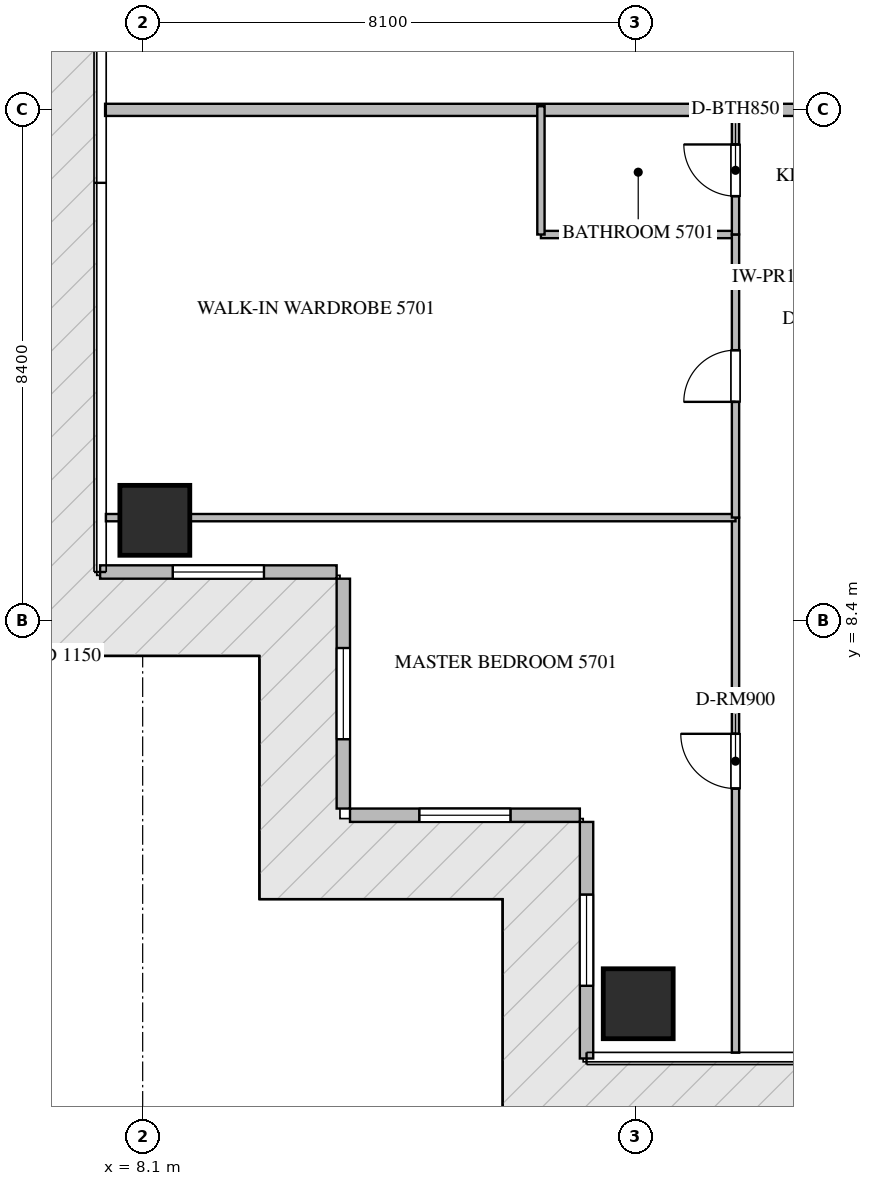
"""IFC4 building model, lengths in metres.
Left out: names, types, materials, properties, quantities, classifications, styles, units other than length and angle.
Written with IfcOpenShell. Run it as: python <this file> out.ifc"""

import sys

from ifc_helpers import new_model, si_unit, direction, frame, frame_2d, origin, origin_2d, place, context, subcontext, project, spatial, rectangle, extrude, source, transform, mapped, element, fill, save


model = new_model("IFC4")
c1 = context("Model", 3, precision=1e-05, world=origin(), true_north=direction((0.0, 1.0)))
c2 = subcontext(c1, "Body", "Model", "MODEL_VIEW")
j1 = project(units=[si_unit("LENGTHUNIT", "METRE"), si_unit("PLANEANGLEUNIT", "RADIAN")], contexts=[c1])
p1 = place(None, origin())
s1 = spatial("IfcSite", under=j1, at=p1, CompositionType="ELEMENT")
p2 = place(p1, origin())
s2 = spatial("IfcBuilding", under=s1, at=p2, CompositionType="ELEMENT")
p3 = place(p2, frame((0.0, 0.0, 229.7)))
s3 = spatial("IfcBuildingStorey", under=s2, at=p3, CompositionType="ELEMENT", Elevation=229.7)
m1 = source(origin(), c2, "Body", "SweptSolid", [
    extrude(rectangle(XDim=1.15, YDim=1.15, at=origin_2d()), origin(), (0.0, 0.0, 1.0), 3.85),
])
for number, where, z_axis, x_axis in (
    (1, (16.25, 2.1, -0.26), (0.0, 0.0, 1.0), (1.0, 0.0, 0.0)),
    (2, (8.3, 10.05, -0.26), (0.0, 0.0, 1.0), (1.0, 0.0, 0.0)),
):
    element("IfcColumn", number, at=place(p3, frame(where, z_axis=z_axis, x_axis=x_axis)), inside=s3, PredefinedType="COLUMN", context=c2, shape_type="MappedRepresentation", body=[
        mapped(m1, transform((0.0, 0.0, 0.0), scale=1.0)),
    ])
p4 = place(p3, frame((7.4, 9.2, 0.0), z_axis=(0.0, 0.0, 1.0), x_axis=(1.0, 0.0, 0.0)))
e3 = element("IfcWall", 3, at=p4, inside=s3, PredefinedType="ELEMENTEDWALL", context=c2, shape_type="SweptSolid", body=[
    extrude(rectangle(XDim=3.89, YDim=0.22, at=frame_2d((1.945, 0.0))), origin(), (0.0, 0.0, 1.0), 3.575),
])
p5 = place(p4, frame((1.195, 0.0, 0.65)))
e4 = element("IfcOpeningElement", 4, at=p5, cuts=e3, PredefinedType="OPENING", context=c2, shape_type="SweptSolid", body=[
    extrude(rectangle(XDim=1.5, YDim=2.25, at=frame_2d((0.75, 1.125))), frame((0.0, 0.12, 0.0), z_axis=(0.0, -1.0, 0.0), x_axis=(1.0, 0.0, 0.0)), (0.0, 0.0, 1.0), 0.24),
])
p6 = place(p3, frame((11.4, 9.09, 0.0), z_axis=(0.0, 0.0, 1.0), x_axis=(0.0, -1.0, 0.0)))
e5 = element("IfcWall", 5, at=p6, inside=s3, PredefinedType="ELEMENTEDWALL", context=c2, shape_type="SweptSolid", body=[
    extrude(rectangle(XDim=3.78, YDim=0.22, at=frame_2d((1.89, 0.0))), origin(), (0.0, 0.0, 1.0), 3.575),
])
p7 = place(p6, frame((1.14, 0.0, 0.65)))
e6 = element("IfcOpeningElement", 6, at=p7, cuts=e5, PredefinedType="OPENING", context=c2, shape_type="SweptSolid", body=[
    extrude(rectangle(XDim=1.5, YDim=2.25, at=frame_2d((0.75, 1.125))), frame((0.0, 0.12, 0.0), z_axis=(0.0, -1.0, 0.0), x_axis=(1.0, 0.0, 0.0)), (0.0, 0.0, 1.0), 0.24),
])
p8 = place(p3, frame((11.51, 5.2, 0.0), z_axis=(0.0, 0.0, 1.0), x_axis=(1.0, 0.0, 0.0)))
e7 = element("IfcWall", 7, at=p8, inside=s3, PredefinedType="ELEMENTEDWALL", context=c2, shape_type="SweptSolid", body=[
    extrude(rectangle(XDim=3.78, YDim=0.22, at=frame_2d((1.89, 0.0))), origin(), (0.0, 0.0, 1.0), 3.575),
])
p9 = place(p8, frame((1.14, 0.0, 0.65)))
e8 = element("IfcOpeningElement", 8, at=p9, cuts=e7, PredefinedType="OPENING", context=c2, shape_type="SweptSolid", body=[
    extrude(rectangle(XDim=1.5, YDim=2.25, at=frame_2d((0.75, 1.125))), frame((0.0, 0.12, 0.0), z_axis=(0.0, -1.0, 0.0), x_axis=(1.0, 0.0, 0.0)), (0.0, 0.0, 1.0), 0.24),
])
p10 = place(p3, frame((15.4, 5.09, 0.0), z_axis=(0.0, 0.0, 1.0), x_axis=(0.0, -1.0, 0.0)))
e9 = element("IfcWall", 9, at=p10, inside=s3, PredefinedType="ELEMENTEDWALL", context=c2, shape_type="SweptSolid", body=[
    extrude(rectangle(XDim=3.89, YDim=0.22, at=frame_2d((1.945, 0.0))), origin(), (0.0, 0.0, 1.0), 3.575),
])
p11 = place(p10, frame((1.195, 0.0, 0.65)))
e10 = element("IfcOpeningElement", 10, at=p11, cuts=e9, PredefinedType="OPENING", context=c2, shape_type="SweptSolid", body=[
    extrude(rectangle(XDim=1.5, YDim=2.25, at=frame_2d((0.75, 1.125))), frame((0.0, 0.12, 0.0), z_axis=(0.0, -1.0, 0.0), x_axis=(1.0, 0.0, 0.0)), (0.0, 0.0, 1.0), 0.24),
])
p12 = place(p3, frame((7.482, 16.8, 0.0), z_axis=(0.0, 0.0, 1.0), x_axis=(1.0, 0.0, 0.0)))
e11 = element("IfcWall", 11, at=p12, inside=s3, PredefinedType="PARTITIONING", context=c2, shape_type="SweptSolid", body=[
    extrude(rectangle(XDim=13.418, YDim=0.2, at=frame_2d((6.709, 0.0))), origin(), (0.0, 0.0, 1.0), 3.59),
])
p13 = place(p3, frame((17.85, 14.05, 0.0), z_axis=(0.0, 0.0, 1.0), x_axis=(1.0, 0.0, 0.0)))
e12 = element("IfcWall", 12, at=p13, inside=s3, PredefinedType="PARTITIONING", context=c2, shape_type="SweptSolid", body=[
    extrude(rectangle(XDim=2.85, YDim=0.12, at=frame_2d((1.425, 0.0))), origin(), (0.0, 0.0, 1.0), 3.59),
])
p14 = place(p13, frame((1.0, 0.0, 0.0)))
e13 = element("IfcOpeningElement", 13, at=p14, cuts=e12, PredefinedType="OPENING", context=c2, shape_type="SweptSolid", body=[
    extrude(rectangle(XDim=0.85, YDim=2.1, at=frame_2d((0.425, 1.05))), frame((0.0, 0.07, 0.0), z_axis=(0.0, -1.0, 0.0), x_axis=(1.0, 0.0, 0.0)), (0.0, 0.0, 1.0), 0.14),
])
p15 = place(p3, frame((17.85, 1.295, 0.0), z_axis=(0.0, 0.0, 1.0), x_axis=(0.0, 1.0, 0.0)))
e14 = element("IfcWall", 14, at=p15, inside=s3, PredefinedType="PARTITIONING", context=c2, shape_type="SweptSolid", body=[
    extrude(rectangle(XDim=8.799, YDim=0.12, at=frame_2d((4.399, 0.0))), origin(), (0.0, 0.0, 1.0), 3.59),
])
p16 = place(p15, frame((4.344, 0.0, 0.0)))
e15 = element("IfcOpeningElement", 15, at=p16, cuts=e14, PredefinedType="OPENING", context=c2, shape_type="SweptSolid", body=[
    extrude(rectangle(XDim=0.9, YDim=2.1, at=frame_2d((0.45, 1.05))), frame((0.0, 0.07, 0.0), z_axis=(0.0, -1.0, 0.0), x_axis=(1.0, 0.0, 0.0)), (0.0, 0.0, 1.0), 0.14),
])
p17 = place(p3, frame((7.495, 10.094, 0.0), z_axis=(0.0, 0.0, 1.0), x_axis=(1.0, 0.0, 0.0)))
e16 = element("IfcWall", 16, at=p17, inside=s3, PredefinedType="PARTITIONING", context=c2, shape_type="SweptSolid", body=[
    extrude(rectangle(XDim=10.355, YDim=0.12, at=frame_2d((5.177, 0.0))), origin(), (0.0, 0.0, 1.0), 3.122),
])
p18 = place(p3, frame((14.65, 14.75, 0.0), z_axis=(0.0, 0.0, 1.0), x_axis=(1.0, 0.0, 0.0)))
e17 = element("IfcWall", 17, at=p18, inside=s3, PredefinedType="PARTITIONING", context=c2, shape_type="SweptSolid", body=[
    extrude(rectangle(XDim=3.2, YDim=0.12, at=frame_2d((1.6, 0.0))), origin(), (0.0, 0.0, 1.0), 3.59),
])
p19 = place(p3, frame((14.65, 14.75, 0.0), z_axis=(0.0, 0.0, 1.0), x_axis=(0.0, 1.0, 0.0)))
e18 = element("IfcWall", 18, at=p19, inside=s3, PredefinedType="PARTITIONING", context=c2, shape_type="SweptSolid", body=[
    extrude(rectangle(XDim=2.11, YDim=0.12, at=frame_2d((1.055, 0.0))), origin(), (0.0, 0.0, 1.0), 3.59),
])
p20 = place(p3, frame((17.85, 10.096, 0.0), z_axis=(0.0, 0.0, 1.0), x_axis=(0.0, 1.0, 0.0)))
e19 = element("IfcWall", 19, at=p20, inside=s3, PredefinedType="PARTITIONING", context=c2, shape_type="SweptSolid", body=[
    extrude(rectangle(XDim=4.654, YDim=0.12, at=frame_2d((2.327, 0.0))), origin(), (0.0, 0.0, 1.0), 3.59),
])
p21 = place(p20, frame((1.902, 0.0, 0.0)))
e20 = element("IfcOpeningElement", 20, at=p21, cuts=e19, PredefinedType="OPENING", context=c2, shape_type="SweptSolid", body=[
    extrude(rectangle(XDim=0.85, YDim=2.1, at=frame_2d((0.425, 1.05))), frame((0.0, 0.07, 0.0), z_axis=(0.0, -1.0, 0.0), x_axis=(1.0, 0.0, 0.0)), (0.0, 0.0, 1.0), 0.14),
])
p22 = place(p3, frame((17.85, 14.752, 0.0), z_axis=(0.0, 0.0, 1.0), x_axis=(0.0, 1.0, 0.0)))
e21 = element("IfcWall", 21, at=p22, inside=s3, PredefinedType="PARTITIONING", context=c2, shape_type="SweptSolid", body=[
    extrude(rectangle(XDim=2.108, YDim=0.12, at=frame_2d((1.054, 0.0))), origin(), (0.0, 0.0, 1.0), 3.59),
])
p23 = place(p22, frame((0.629, 0.0, 0.0)))
e22 = element("IfcOpeningElement", 22, at=p23, cuts=e21, PredefinedType="OPENING", context=c2, shape_type="SweptSolid", body=[
    extrude(rectangle(XDim=0.85, YDim=2.1, at=frame_2d((0.425, 1.05))), frame((0.0, 0.07, 0.0), z_axis=(0.0, -1.0, 0.0), x_axis=(1.0, 0.0, 0.0)), (0.0, 0.0, 1.0), 0.14),
])
m2 = source(origin(), c2, "Body", "SweptSolid", [
    extrude(rectangle(XDim=1.5, YDim=2.25, at=frame_2d((0.75, 1.125))), frame((0.0, 0.03, 0.0), z_axis=(0.0, -1.0, 0.0), x_axis=(1.0, 0.0, 0.0)), (0.0, 0.0, 1.0), 0.06),
])
p24 = place(p5, origin())
e23 = element("IfcWindow", 23, at=p24, inside=s3, PartitioningType="SINGLE_PANEL", PredefinedType="WINDOW", context=c2, shape_type="MappedRepresentation", body=[
    mapped(m2, transform((0.0, 0.0, 0.0), scale=1.0)),
])
fill(e4, e23)
p25 = place(p7, origin())
e24 = element("IfcWindow", 24, at=p25, inside=s3, PartitioningType="SINGLE_PANEL", PredefinedType="WINDOW", context=c2, shape_type="MappedRepresentation", body=[
    mapped(m2, transform((0.0, 0.0, 0.0), scale=1.0)),
])
fill(e6, e24)
p26 = place(p9, origin())
e25 = element("IfcWindow", 25, at=p26, inside=s3, PartitioningType="SINGLE_PANEL", PredefinedType="WINDOW", context=c2, shape_type="MappedRepresentation", body=[
    mapped(m2, transform((0.0, 0.0, 0.0), scale=1.0)),
])
fill(e8, e25)
p27 = place(p11, origin())
e26 = element("IfcWindow", 26, at=p27, inside=s3, PartitioningType="SINGLE_PANEL", PredefinedType="WINDOW", context=c2, shape_type="MappedRepresentation", body=[
    mapped(m2, transform((0.0, 0.0, 0.0), scale=1.0)),
])
fill(e10, e26)
m3 = source(origin(), c2, "Body", "SweptSolid", [
    extrude(rectangle(XDim=0.9, YDim=2.1, at=frame_2d((0.45, 1.05))), frame((0.0, 0.025, 0.0), z_axis=(0.0, -1.0, 0.0), x_axis=(1.0, 0.0, 0.0)), (0.0, 0.0, 1.0), 0.05),
])
p28 = place(p16, origin())
e27 = element("IfcDoor", 27, at=p28, inside=s3, OperationType="SINGLE_SWING_RIGHT", PredefinedType="DOOR", context=c2, shape_type="MappedRepresentation", body=[
    mapped(m3, transform((0.0, 0.0, 0.0), scale=1.0)),
])
fill(e15, e27)
m4 = source(origin(), c2, "Body", "SweptSolid", [
    extrude(rectangle(XDim=0.85, YDim=2.1, at=frame_2d((0.425, 1.05))), frame((0.0, 0.025, 0.0), z_axis=(0.0, -1.0, 0.0), x_axis=(1.0, 0.0, 0.0)), (0.0, 0.0, 1.0), 0.05),
])
p29 = place(p21, origin())
e28 = element("IfcDoor", 28, at=p29, inside=s3, OperationType="SINGLE_SWING_LEFT", PredefinedType="DOOR", context=c2, shape_type="MappedRepresentation", body=[
    mapped(m4, transform((0.0, 0.0, 0.0), scale=1.0)),
])
fill(e20, e28)
p30 = place(p23, origin())
e29 = element("IfcDoor", 29, at=p30, inside=s3, OperationType="SINGLE_SWING_RIGHT", PredefinedType="DOOR", context=c2, shape_type="MappedRepresentation", body=[
    mapped(m4, transform((0.0, 0.0, 0.0), scale=1.0)),
])
fill(e22, e29)
save(model, sys.argv[1])
